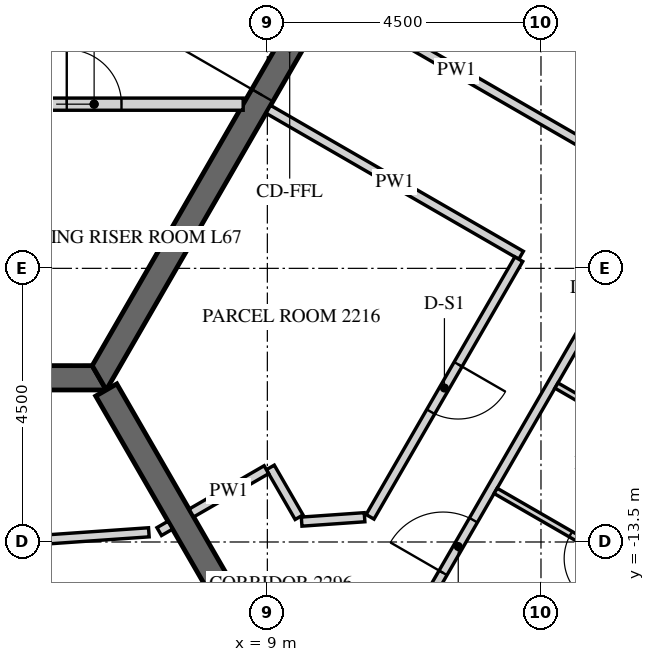
"""IFC4 building model, lengths in metres.
Left out: names, types, materials, properties, quantities, classifications, styles, units other than length and angle.
Written with IfcOpenShell. Run it as: python <this file> out.ifc"""

import sys

from ifc_helpers import new_model, si_unit, direction, frame, frame_2d, origin, place, context, subcontext, project, spatial, polyline, rectangle, outline, extrude, element, fill, save


model = new_model("IFC4")
c1 = context("Model", 3, precision=1e-05, world=origin(), true_north=direction((0.0, 1.0)))
c2 = subcontext(c1, "Body", "Model", "MODEL_VIEW")
j1 = project(units=[si_unit("LENGTHUNIT", "METRE"), si_unit("PLANEANGLEUNIT", "RADIAN")], contexts=[c1])
p1 = place(None, origin())
s1 = spatial("IfcSite", under=j1, at=p1, CompositionType="ELEMENT")
p2 = place(p1, origin())
s2 = spatial("IfcBuilding", under=s1, at=p2, CompositionType="ELEMENT")
p3 = place(p2, frame((0.0, 0.0, 279.6)))
s3 = spatial("IfcBuildingStorey", under=s2, at=p3, CompositionType="ELEMENT", Elevation=279.6)
p4 = place(p3, frame((-6.235, -10.8, -0.15), z_axis=(0.0, 0.0, 1.0), x_axis=(1.0, 0.0, 0.0)))
e1 = element("IfcWall", 1, at=p4, inside=s3, PredefinedType="SHEAR", context=c2, shape_type="SweptSolid", body=[
    extrude(outline(polyline([(-0.115, -0.2), (12.586, -0.2), (12.355, 0.2), (0.115, 0.2), (-0.115, -0.2)])), origin(), (0.0, 0.0, 1.0), 3.9),
])
p5 = place(p3, frame((6.235, -10.8, -0.15), z_axis=(0.0, 0.0, 1.0), x_axis=(0.499996419489, 0.866027470984, 0.0)))
e2 = element("IfcWall", 2, at=p5, inside=s3, PredefinedType="SHEAR", context=c2, shape_type="SweptSolid", body=[
    extrude(outline(polyline([(-0.115, -0.2), (12.586, -0.2), (12.355, 0.2), (0.115, 0.2), (-0.115, -0.2)])), origin(), (0.0, 0.0, 1.0), 3.9),
])
p6 = place(p5, frame((5.364, 0.0, 0.15)))
e3 = element("IfcOpeningElement", 3, at=p6, cuts=e2, PredefinedType="OPENING", context=c2, shape_type="SweptSolid", body=[
    extrude(rectangle(XDim=1.8, YDim=2.4, at=frame_2d((0.9, 1.2))), frame((0.0, 0.21, 0.0), z_axis=(0.0, -1.0, 0.0), x_axis=(1.0, 0.0, 0.0)), (0.0, 0.0, 1.0), 0.42),
])
p7 = place(p3, frame((6.351, -11.0, -0.15), z_axis=(0.0, 0.0, 1.0), x_axis=(0.499998894578, -0.866026041999, 0.0)))
e4 = element("IfcWall", 4, at=p7, inside=s3, PredefinedType="SHEAR", context=c2, shape_type="SweptSolid", body=[
    extrude(rectangle(XDim=15.544, YDim=0.4, at=frame_2d((7.772, 0.0))), origin(), (0.0, 0.0, 1.0), 3.9),
])
p8 = place(p7, frame((6.872, 0.0, 0.15)))
e5 = element("IfcOpeningElement", 5, at=p8, cuts=e4, PredefinedType="OPENING", context=c2, shape_type="SweptSolid", body=[
    extrude(rectangle(XDim=1.8, YDim=2.4, at=frame_2d((0.9, 1.2))), frame((0.0, 0.21, 0.0), z_axis=(0.0, -1.0, 0.0), x_axis=(1.0, 0.0, 0.0)), (0.0, 0.0, 1.0), 0.42),
])
p9 = place(p3, frame((3.7, -6.3, 0.0), z_axis=(0.0, 0.0, 1.0), x_axis=(1.0, 0.0, 0.0)))
e6 = element("IfcWall", 6, at=p9, inside=s3, PredefinedType="PARTITIONING", context=c2, shape_type="SweptSolid", body=[
    extrude(rectangle(XDim=4.903, YDim=0.2, at=frame_2d((2.451, 0.0))), origin(), (0.0, 0.0, 1.0), 3.65),
])
p10 = place(p9, frame((2.001, 0.0, 0.0)))
e7 = element("IfcOpeningElement", 7, at=p10, cuts=e6, PredefinedType="OPENING", context=c2, shape_type="SweptSolid", body=[
    extrude(rectangle(XDim=0.9, YDim=2.1, at=frame_2d((0.45, 1.05))), frame((0.0, 0.11, 0.0), z_axis=(0.0, -1.0, 0.0), x_axis=(1.0, 0.0, 0.0)), (0.0, 0.0, 1.0), 0.22),
])
p11 = place(p3, frame((7.404, -13.224, 0.0), z_axis=(0.0, 0.0, 1.0), x_axis=(-0.866088799389, -0.499890179513, 0.0)))
e8 = element("IfcWall", 8, at=p11, inside=s3, PredefinedType="PARTITIONING", context=c2, shape_type="SweptSolid", body=[
    extrude(rectangle(XDim=0.21, YDim=0.15, at=frame_2d((0.105, 0.0))), origin(), (0.0, 0.0, 1.0), 2.988),
])
p12 = place(p3, frame((7.051, -13.341, 0.0), z_axis=(0.0, 0.0, 1.0), x_axis=(-0.997563599815, -0.069762915103, 0.0)))
e9 = element("IfcWall", 9, at=p12, inside=s3, PredefinedType="PARTITIONING", context=c2, shape_type="SweptSolid", body=[
    extrude(rectangle(XDim=16.952, YDim=0.15, at=frame_2d((8.476, 0.0))), origin(), (0.0, 0.0, 1.0), 2.988),
])
p13 = place(p12, frame((8.026, 0.0, 0.0)))
e10 = element("IfcOpeningElement", 10, at=p13, cuts=e9, PredefinedType="OPENING", context=c2, shape_type="SweptSolid", body=[
    extrude(rectangle(XDim=0.9, YDim=2.1, at=frame_2d((0.45, 1.05))), frame((0.0, 0.085, 0.0), z_axis=(0.0, -1.0, 0.0), x_axis=(1.0, 0.0, 0.0)), (0.0, 0.0, 1.0), 0.17),
])
p14 = place(p3, frame((11.627, -14.462, 0.0), z_axis=(0.0, 0.0, 1.0), x_axis=(0.499994634027, 0.866028501808, 0.0)))
e11 = element("IfcWall", 11, at=p14, inside=s3, PredefinedType="PARTITIONING", context=c2, shape_type="SweptSolid", body=[
    extrude(rectangle(XDim=15.296, YDim=0.15, at=frame_2d((7.648, 0.0))), origin(), (0.0, 0.0, 1.0), 2.988),
])
p15 = place(p14, frame((0.525, 0.0, 0.0)))
e12 = element("IfcOpeningElement", 12, at=p15, cuts=e11, PredefinedType="OPENING", context=c2, shape_type="SweptSolid", body=[
    extrude(rectangle(XDim=1.0, YDim=2.1, at=frame_2d((0.5, 1.05))), frame((0.0, 0.085, 0.0), z_axis=(0.0, -1.0, 0.0), x_axis=(1.0, 0.0, 0.0)), (0.0, 0.0, 1.0), 0.17),
])
p16 = place(p14, frame((14.146, 0.0, 0.0)))
e13 = element("IfcOpeningElement", 13, at=p16, cuts=e11, PredefinedType="OPENING", context=c2, shape_type="SweptSolid", body=[
    extrude(rectangle(XDim=1.0, YDim=2.1, at=frame_2d((0.5, 1.05))), frame((0.0, 0.085, 0.0), z_axis=(0.0, -1.0, 0.0), x_axis=(1.0, 0.0, 0.0)), (0.0, 0.0, 1.0), 0.17),
])
p17 = place(p3, frame((14.158, -6.928, 0.0), z_axis=(0.0, 0.0, 1.0), x_axis=(-0.866024684746, 0.500001245408, 0.0)))
e14 = element("IfcWall", 14, at=p17, inside=s3, PredefinedType="PARTITIONING", context=c2, shape_type="SweptSolid", body=[
    extrude(rectangle(XDim=4.725, YDim=0.15, at=frame_2d((2.363, 0.0))), origin(), (0.0, 0.0, 1.0), 2.988),
])
p18 = place(p3, frame((9.016, -6.384, 0.0), z_axis=(0.0, 0.0, 1.0), x_axis=(0.866015339567, -0.500017431331, 0.0)))
e15 = element("IfcWall", 15, at=p18, inside=s3, PredefinedType="PARTITIONING", context=c2, shape_type="SweptSolid", body=[
    extrude(rectangle(XDim=4.8, YDim=0.15, at=frame_2d((2.4, 0.0))), origin(), (0.0, 0.0, 1.0), 2.988),
])
p19 = place(p3, frame((13.135, -8.849, 0.0), z_axis=(0.0, 0.0, 1.0), x_axis=(-0.500024829938, -0.866011067739, 0.0)))
e16 = element("IfcWall", 16, at=p19, inside=s3, PredefinedType="PARTITIONING", context=c2, shape_type="SweptSolid", body=[
    extrude(rectangle(XDim=4.892, YDim=0.15, at=frame_2d((2.446, 0.0))), origin(), (0.0, 0.0, 1.0), 2.988),
])
p20 = place(p19, frame((1.996, 0.0, 0.0)))
e17 = element("IfcOpeningElement", 17, at=p20, cuts=e16, PredefinedType="OPENING", context=c2, shape_type="SweptSolid", body=[
    extrude(rectangle(XDim=0.9, YDim=2.1, at=frame_2d((0.45, 1.05))), frame((0.0, 0.085, 0.0), z_axis=(0.0, -1.0, 0.0), x_axis=(1.0, 0.0, 0.0)), (0.0, 0.0, 1.0), 0.17),
])
p21 = place(p3, frame((10.599, -13.093, 0.0), z_axis=(0.0, 0.0, 1.0), x_axis=(-0.99755453913, -0.069892356245, 0.0)))
e18 = element("IfcWall", 18, at=p21, inside=s3, PredefinedType="PARTITIONING", context=c2, shape_type="SweptSolid", body=[
    extrude(rectangle(XDim=1.037, YDim=0.15, at=frame_2d((0.519, 0.0))), origin(), (0.0, 0.0, 1.0), 2.988),
])
p22 = place(p3, frame((9.522, -13.093, 0.0), z_axis=(0.0, 0.0, 1.0), x_axis=(-0.499804398801, 0.866138304741, 0.0)))
e19 = element("IfcWall", 19, at=p22, inside=s3, PredefinedType="PARTITIONING", context=c2, shape_type="SweptSolid", body=[
    extrude(rectangle(XDim=0.946, YDim=0.15, at=frame_2d((0.473, 0.0))), origin(), (0.0, 0.0, 1.0), 2.988),
])
p23 = place(p3, frame((8.984, -12.311, 0.0), z_axis=(0.0, 0.0, 1.0), x_axis=(-0.866020080793, -0.500009219579, 0.0)))
e20 = element("IfcWall", 20, at=p23, inside=s3, PredefinedType="PARTITIONING", context=c2, shape_type="SweptSolid", body=[
    extrude(rectangle(XDim=1.425, YDim=0.15, at=frame_2d((0.712, 0.0))), origin(), (0.0, 0.0, 1.0), 2.988),
])
p24 = place(p3, frame((13.754, -10.927, 0.0), z_axis=(0.0, 0.0, 1.0), x_axis=(0.866040420308, -0.499973989716, 0.0)))
e21 = element("IfcWall", 21, at=p24, inside=s3, PredefinedType="PARTITIONING", context=c2, shape_type="SweptSolid", body=[
    extrude(rectangle(XDim=3.725, YDim=0.1, at=frame_2d((1.862, 0.0))), origin(), (0.0, 0.0, 1.0), 2.988),
])
p25 = place(p3, frame((15.98, -14.522, 0.0), z_axis=(0.0, 0.0, 1.0), x_axis=(-0.866012039196, 0.500023147432, 0.0)))
e22 = element("IfcWall", 22, at=p25, inside=s3, PredefinedType="PARTITIONING", context=c2, shape_type="SweptSolid", body=[
    extrude(rectangle(XDim=3.725, YDim=0.1, at=frame_2d((1.862, 0.0))), origin(), (0.0, 0.0, 1.0), 2.988),
])
p26 = place(p25, frame((1.5, 0.0, 0.0)))
e23 = element("IfcOpeningElement", 23, at=p26, cuts=e22, PredefinedType="OPENING", context=c2, shape_type="SweptSolid", body=[
    extrude(rectangle(XDim=0.8, YDim=2.1, at=frame_2d((0.4, 1.05))), frame((0.0, 0.06, 0.0), z_axis=(0.0, -1.0, 0.0), x_axis=(1.0, 0.0, 0.0)), (0.0, 0.0, 1.0), 0.12),
])
p27 = place(p6, origin())
e24 = element("IfcDoor", 24, at=p27, inside=s3, OperationType="DOUBLE_DOOR_SINGLE_SWING", PredefinedType="DOOR", context=c2, shape_type="SweptSolid", body=[
    extrude(rectangle(XDim=1.8, YDim=2.4, at=frame_2d((0.9, 1.2))), frame((0.0, 0.025, 0.0), z_axis=(0.0, -1.0, 0.0), x_axis=(1.0, 0.0, 0.0)), (0.0, 0.0, 1.0), 0.05),
])
fill(e3, e24)
p28 = place(p10, origin())
e25 = element("IfcDoor", 25, at=p28, inside=s3, OperationType="SINGLE_SWING_LEFT", PredefinedType="DOOR", context=c2, shape_type="SweptSolid", body=[
    extrude(rectangle(XDim=0.9, YDim=2.1, at=frame_2d((0.45, 1.05))), frame((0.0, 0.025, 0.0), z_axis=(0.0, -1.0, 0.0), x_axis=(1.0, 0.0, 0.0)), (0.0, 0.0, 1.0), 0.05),
])
fill(e7, e25)
p29 = place(p15, origin())
e26 = element("IfcDoor", 26, at=p29, inside=s3, OperationType="SINGLE_SWING_RIGHT", PredefinedType="DOOR", context=c2, shape_type="SweptSolid", body=[
    extrude(rectangle(XDim=1.0, YDim=2.1, at=frame_2d((0.5, 1.05))), frame((0.0, 0.025, 0.0), z_axis=(0.0, -1.0, 0.0), x_axis=(1.0, 0.0, 0.0)), (0.0, 0.0, 1.0), 0.05),
])
fill(e12, e26)
p30 = place(p26, origin())
e27 = element("IfcDoor", 27, at=p30, inside=s3, OperationType="SINGLE_SWING_LEFT", PredefinedType="DOOR", context=c2, shape_type="SweptSolid", body=[
    extrude(rectangle(XDim=0.8, YDim=2.1, at=frame_2d((0.4, 1.05))), frame((0.0, 0.025, 0.0), z_axis=(0.0, -1.0, 0.0), x_axis=(1.0, 0.0, 0.0)), (0.0, 0.0, 1.0), 0.05),
])
fill(e23, e27)
p31 = place(p20, origin())
e28 = element("IfcDoor", 28, at=p31, inside=s3, OperationType="SINGLE_SWING_LEFT", PredefinedType="DOOR", context=c2, shape_type="SweptSolid", body=[
    extrude(rectangle(XDim=0.9, YDim=2.1, at=frame_2d((0.45, 1.05))), frame((0.0, 0.025, 0.0), z_axis=(0.0, -1.0, 0.0), x_axis=(1.0, 0.0, 0.0)), (0.0, 0.0, 1.0), 0.05),
])
fill(e17, e28)
save(model, sys.argv[1])
